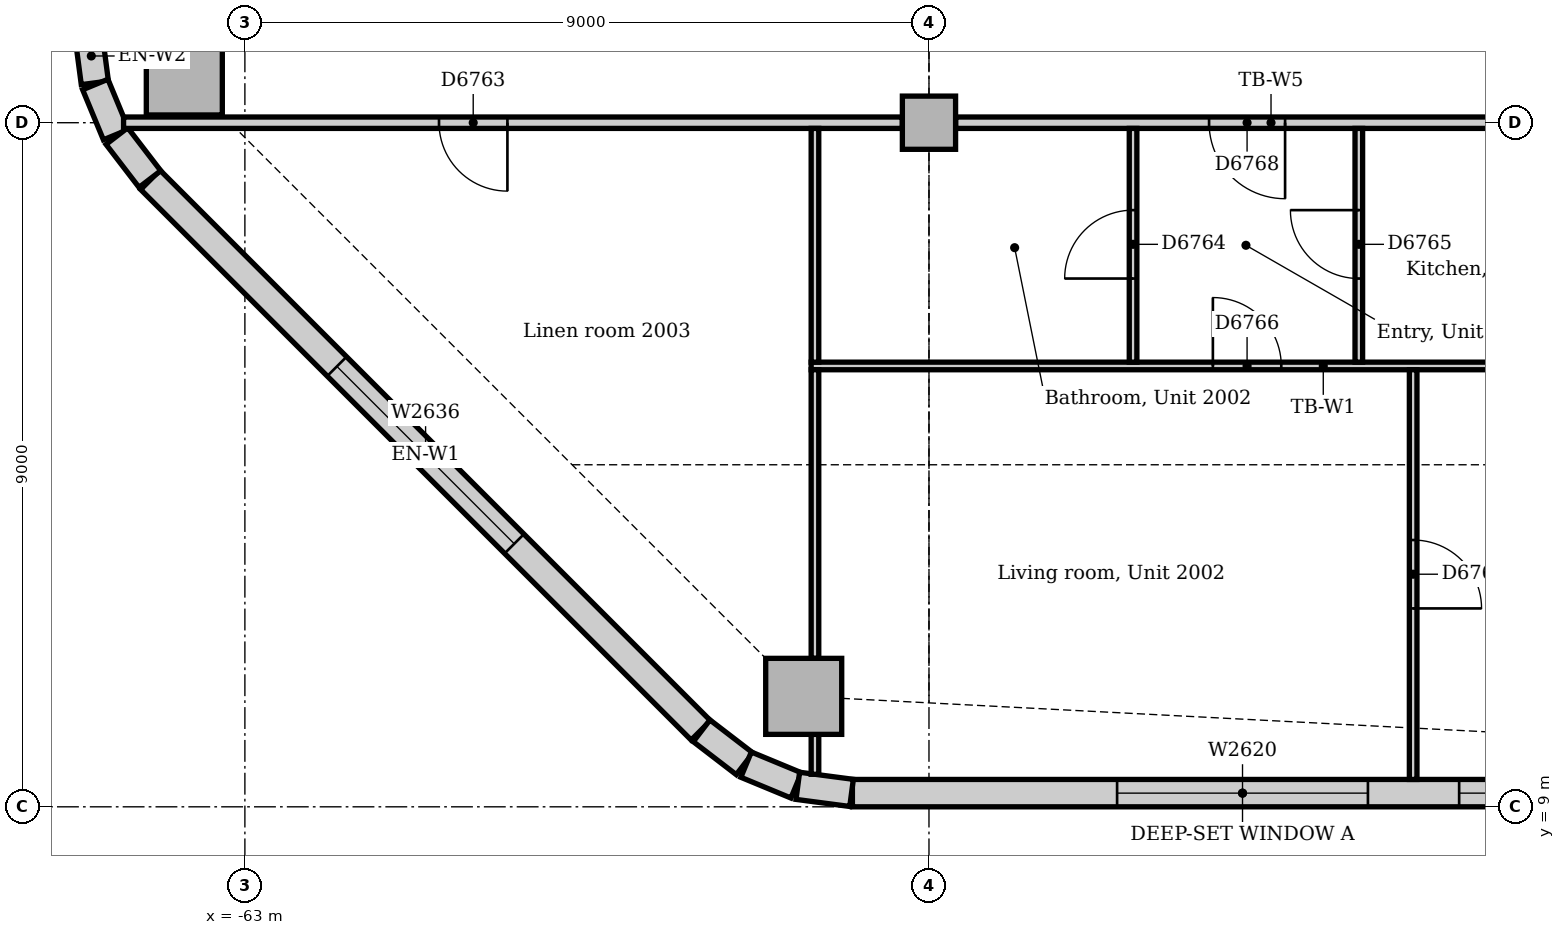
"""IFC4 building model, lengths in metres.
Left out: names, types, materials, properties, quantities, classifications, styles, units other than length and angle.
Written with IfcOpenShell. Run it as: python <this file> out.ifc"""

import sys

from ifc_helpers import new_model, si_unit, direction, frame, frame_2d, origin, origin_2d, place, context, subcontext, project, spatial, rectangle, extrude, element, fill, save


model = new_model("IFC4")
c1 = context("Model", 3, precision=1e-05, world=origin(), true_north=direction((0.0, 1.0)))
c2 = subcontext(c1, "Body", "Model", "MODEL_VIEW")
j1 = project(units=[si_unit("LENGTHUNIT", "METRE"), si_unit("PLANEANGLEUNIT", "RADIAN")], contexts=[c1])
p1 = place(None, origin())
s1 = spatial("IfcSite", under=j1, at=p1, CompositionType="ELEMENT")
p2 = place(p1, origin())
s2 = spatial("IfcBuilding", under=s1, at=p2, CompositionType="ELEMENT")
p3 = place(p2, frame((0.0, 0.0, 87.0)))
s3 = spatial("IfcBuildingStorey", under=s2, at=p3, CompositionType="ELEMENT", Elevation=87.0)
for number, where, z_axis, x_axis in (
    (1, (-55.648, 10.453, 0.0), (0.0, 0.0, 1.0), (1.0, 0.0, 0.0)),
    (2, (-63.797, 18.602, 0.0), (0.0, 0.0, 1.0), (1.0, 0.0, 0.0)),
):
    element("IfcColumn", number, at=place(p3, frame(where, z_axis=z_axis, x_axis=x_axis)), inside=s3, PredefinedType="COLUMN", context=c2, shape_type="SweptSolid", body=[
        extrude(rectangle(XDim=1.0, YDim=1.0, at=origin_2d()), origin(), (0.0, 0.0, 1.0), 3.85),
    ])
p4 = place(p3, frame((-54.0, 18.0, 0.0), z_axis=(0.0, 0.0, 1.0), x_axis=(1.0, 0.0, 0.0)))
e3 = element("IfcColumn", 3, at=p4, inside=s3, PredefinedType="COLUMN", context=c2, shape_type="SweptSolid", body=[
    extrude(rectangle(XDim=0.7, YDim=0.7, at=origin_2d()), origin(), (0.0, 0.0, 1.0), 3.85),
])
p5 = place(p3, frame((-55.007, 9.18, 0.0), z_axis=(0.0, 0.0, 1.0), x_axis=(1.0, 0.0, 0.0)))
e4 = element("IfcWall", 4, at=p5, inside=s3, PredefinedType="STANDARD", context=c2, shape_type="SweptSolid", body=[
    extrude(rectangle(XDim=23.765, YDim=0.36, at=frame_2d((11.882, 0.0))), origin(), (0.0, 0.0, 1.0), 3.85),
])
p6 = place(p5, frame((3.482, 0.0, 0.9)))
e5 = element("IfcOpeningElement", 5, at=p6, cuts=e4, PredefinedType="OPENING", context=c2, shape_type="SweptSolid", body=[
    extrude(rectangle(XDim=3.3, YDim=1.6, at=frame_2d((1.65, 0.8))), frame((0.0, 0.19, 0.0), z_axis=(0.0, -1.0, 0.0), x_axis=(1.0, 0.0, 0.0)), (0.0, 0.0, 1.0), 0.38),
])
p7 = place(p5, frame((7.982, 0.0, 0.9)))
e6 = element("IfcOpeningElement", 6, at=p7, cuts=e4, PredefinedType="OPENING", context=c2, shape_type="SweptSolid", body=[
    extrude(rectangle(XDim=3.3, YDim=1.6, at=frame_2d((1.65, 0.8))), frame((0.0, 0.19, 0.0), z_axis=(0.0, -1.0, 0.0), x_axis=(1.0, 0.0, 0.0)), (0.0, 0.0, 1.0), 0.38),
])
p8 = place(p5, frame((13.232, 0.0, 0.9)))
e7 = element("IfcOpeningElement", 7, at=p8, cuts=e4, PredefinedType="OPENING", context=c2, shape_type="SweptSolid", body=[
    extrude(rectangle(XDim=1.8, YDim=1.6, at=frame_2d((0.9, 0.8))), frame((0.0, 0.19, 0.0), z_axis=(0.0, -1.0, 0.0), x_axis=(1.0, 0.0, 0.0)), (0.0, 0.0, 1.0), 0.38),
])
p9 = place(p5, frame((16.982, 0.0, 0.9)))
e8 = element("IfcOpeningElement", 8, at=p9, cuts=e4, PredefinedType="OPENING", context=c2, shape_type="SweptSolid", body=[
    extrude(rectangle(XDim=3.3, YDim=1.6, at=frame_2d((1.65, 0.8))), frame((0.0, 0.19, 0.0), z_axis=(0.0, -1.0, 0.0), x_axis=(1.0, 0.0, 0.0)), (0.0, 0.0, 1.0), 0.38),
])
p10 = place(p3, frame((-64.244, 17.249, 0.0), z_axis=(0.0, 0.0, 1.0), x_axis=(0.707106781187, -0.707106781187, 0.0)))
e9 = element("IfcWall", 9, at=p10, inside=s3, PredefinedType="STANDARD", context=c2, shape_type="SweptSolid", body=[
    extrude(rectangle(XDim=10.243, YDim=0.36, at=frame_2d((5.121, 0.0))), origin(), (0.0, 0.0, 1.0), 3.85),
])
p11 = place(p10, frame((3.471, 0.0, 0.9)))
e10 = element("IfcOpeningElement", 10, at=p11, cuts=e9, PredefinedType="OPENING", context=c2, shape_type="SweptSolid", body=[
    extrude(rectangle(XDim=3.3, YDim=1.6, at=frame_2d((1.65, 0.8))), frame((0.0, 0.19, 0.0), z_axis=(0.0, -1.0, 0.0), x_axis=(1.0, 0.0, 0.0)), (0.0, 0.0, 1.0), 0.38),
])
for number, where, z_axis, x_axis in (
    (11, (-65.067, 19.231, 0.0), (0.0, 0.0, 1.0), (0.131, -0.991, 0.0)),
    (12, (-64.968, 18.503, 0.0), (0.0, 0.0, 1.0), (0.383, -0.924, 0.0)),
):
    element("IfcWall", number, at=place(p3, frame(where, z_axis=z_axis, x_axis=x_axis)), inside=s3, PredefinedType="STANDARD", context=c2, shape_type="SweptSolid", body=[
        extrude(rectangle(XDim=0.713, YDim=0.36, at=frame_2d((0.356, 0.0))), origin(), (0.0, 0.0, 1.0), 3.85),
    ])
for number, where, z_axis, x_axis in (
    (13, (-64.684, 17.825, 0.0), (0.0, 0.0, 1.0), (0.609, -0.793, 0.0)),
    (14, (-56.991, 10.0, 0.0), (0.0, 0.0, 1.0), (0.793, -0.609, 0.0)),
):
    element("IfcWall", number, at=place(p3, frame(where, z_axis=z_axis, x_axis=x_axis)), inside=s3, PredefinedType="STANDARD", context=c2, shape_type="SweptSolid", body=[
        extrude(rectangle(XDim=0.713, YDim=0.36, at=frame_2d((0.357, 0.0))), origin(), (0.0, 0.0, 1.0), 3.85),
    ])
for number, where, z_axis, x_axis in (
    (15, (-56.406, 9.555, 0.0), (0.0, 0.0, 1.0), (0.924, -0.383, 0.0)),
    (16, (-55.726, 9.276, 0.0), (0.0, 0.0, 1.0), (0.991, -0.131, 0.0)),
):
    element("IfcWall", number, at=place(p3, frame(where, z_axis=z_axis, x_axis=x_axis)), inside=s3, PredefinedType="STANDARD", context=c2, shape_type="SweptSolid", body=[
        extrude(rectangle(XDim=0.713, YDim=0.36, at=frame_2d((0.356, 0.0))), origin(), (0.0, 0.0, 1.0), 3.85),
    ])
p12 = place(p3, frame((-53.65, 18.0, 0.0), z_axis=(0.0, 0.0, 1.0), x_axis=(1.0, 0.0, 0.0)))
e17 = element("IfcWall", 17, at=p12, inside=s3, PredefinedType="PARTITIONING", context=c2, shape_type="SweptSolid", body=[
    extrude(rectangle(XDim=8.3, YDim=0.15, at=frame_2d((4.15, 0.0))), origin(), (0.0, 0.0, 1.0), 3.158),
])
p13 = place(p12, frame((3.335, 0.0, 0.0)))
e18 = element("IfcOpeningElement", 18, at=p13, cuts=e17, PredefinedType="OPENING", context=c2, shape_type="SweptSolid", body=[
    extrude(rectangle(XDim=1.0, YDim=2.1, at=frame_2d((0.5, 1.05))), frame((0.0, 0.085, 0.0), z_axis=(0.0, -1.0, 0.0), x_axis=(1.0, 0.0, 0.0)), (0.0, 0.0, 1.0), 0.17),
])
p14 = place(p3, frame((-64.596, 18.0, 0.0), z_axis=(0.0, 0.0, 1.0), x_axis=(1.0, 0.0, 0.0)))
e19 = element("IfcWall", 19, at=p14, inside=s3, PredefinedType="PARTITIONING", context=c2, shape_type="SweptSolid", body=[
    extrude(rectangle(XDim=10.246, YDim=0.15, at=frame_2d((5.123, 0.0))), origin(), (0.0, 0.0, 1.0), 3.158),
])
p15 = place(p14, frame((4.15, 0.0, 0.0)))
e20 = element("IfcOpeningElement", 20, at=p15, cuts=e19, PredefinedType="OPENING", context=c2, shape_type="SweptSolid", body=[
    extrude(rectangle(XDim=0.9, YDim=2.1, at=frame_2d((0.45, 1.05))), frame((0.0, 0.085, 0.0), z_axis=(0.0, -1.0, 0.0), x_axis=(1.0, 0.0, 0.0)), (0.0, 0.0, 1.0), 0.17),
])
p16 = place(p3, frame((-55.55, 14.8, 0.0), z_axis=(0.0, 0.0, 1.0), x_axis=(1.0, 0.0, 0.0)))
e21 = element("IfcWall", 21, at=p16, inside=s3, PredefinedType="PARTITIONING", context=c2, shape_type="SweptSolid", body=[
    extrude(rectangle(XDim=13.475, YDim=0.1, at=frame_2d((6.737, 0.0))), origin(), (0.0, 0.0, 1.0), 3.85),
])
p17 = place(p16, frame((5.285, 0.0, 0.0)))
e22 = element("IfcOpeningElement", 22, at=p17, cuts=e21, PredefinedType="OPENING", context=c2, shape_type="SweptSolid", body=[
    extrude(rectangle(XDim=0.9, YDim=2.1, at=frame_2d((0.45, 1.05))), frame((0.0, 0.06, 0.0), z_axis=(0.0, -1.0, 0.0), x_axis=(1.0, 0.0, 0.0)), (0.0, 0.0, 1.0), 0.12),
])
p18 = place(p3, frame((-55.5, 14.85, 0.0), z_axis=(0.0, 0.0, 1.0), x_axis=(0.0, 1.0, 0.0)))
e23 = element("IfcWall", 23, at=p18, inside=s3, PredefinedType="PARTITIONING", context=c2, shape_type="SweptSolid", body=[
    extrude(rectangle(XDim=3.075, YDim=0.1, at=frame_2d((1.538, 0.0))), origin(), (0.0, 0.0, 1.0), 3.85),
])
p19 = place(p3, frame((-55.5, 10.953, 0.0), z_axis=(0.0, 0.0, 1.0), x_axis=(0.0, 1.0, 0.0)))
e24 = element("IfcWall", 24, at=p19, inside=s3, PredefinedType="PARTITIONING", context=c2, shape_type="SweptSolid", body=[
    extrude(rectangle(XDim=3.797, YDim=0.1, at=frame_2d((1.898, 0.0))), origin(), (0.0, 0.0, 1.0), 3.85),
])
p20 = place(p3, frame((-55.5, 9.428, 0.0), z_axis=(0.0, 0.0, 1.0), x_axis=(0.0, 1.0, 0.0)))
e25 = element("IfcWall", 25, at=p20, inside=s3, PredefinedType="PARTITIONING", context=c2, shape_type="SweptSolid", body=[
    extrude(rectangle(XDim=0.525, YDim=0.1, at=frame_2d((0.263, 0.0))), origin(), (0.0, 0.0, 1.0), 3.85),
])
p21 = place(p3, frame((-47.63, 9.36, 0.0), z_axis=(0.0, 0.0, 1.0), x_axis=(0.0, 1.0, 0.0)))
e26 = element("IfcWall", 26, at=p21, inside=s3, PredefinedType="PARTITIONING", context=c2, shape_type="SweptSolid", body=[
    extrude(rectangle(XDim=5.39, YDim=0.1, at=frame_2d((2.695, 0.0))), origin(), (0.0, 0.0, 1.0), 3.85),
])
p22 = place(p21, frame((2.25, 0.0, 0.0)))
e27 = element("IfcOpeningElement", 27, at=p22, cuts=e26, PredefinedType="OPENING", context=c2, shape_type="SweptSolid", body=[
    extrude(rectangle(XDim=0.9, YDim=2.1, at=frame_2d((0.45, 1.05))), frame((0.0, 0.06, 0.0), z_axis=(0.0, -1.0, 0.0), x_axis=(1.0, 0.0, 0.0)), (0.0, 0.0, 1.0), 0.12),
])
p23 = place(p3, frame((-51.315, 14.85, 0.0), z_axis=(0.0, 0.0, 1.0), x_axis=(0.0, 1.0, 0.0)))
e28 = element("IfcWall", 28, at=p23, inside=s3, PredefinedType="PARTITIONING", context=c2, shape_type="SweptSolid", body=[
    extrude(rectangle(XDim=3.075, YDim=0.1, at=frame_2d((1.538, 0.0))), origin(), (0.0, 0.0, 1.0), 3.85),
])
p24 = place(p23, frame((1.1, 0.0, 0.0)))
e29 = element("IfcOpeningElement", 29, at=p24, cuts=e28, PredefinedType="OPENING", context=c2, shape_type="SweptSolid", body=[
    extrude(rectangle(XDim=0.9, YDim=2.1, at=frame_2d((0.45, 1.05))), frame((0.0, 0.06, 0.0), z_axis=(0.0, -1.0, 0.0), x_axis=(1.0, 0.0, 0.0)), (0.0, 0.0, 1.0), 0.12),
])
p25 = place(p3, frame((-48.345, 14.85, 0.0), z_axis=(0.0, 0.0, 1.0), x_axis=(0.0, 1.0, 0.0)))
e30 = element("IfcWall", 30, at=p25, inside=s3, PredefinedType="PARTITIONING", context=c2, shape_type="SweptSolid", body=[
    extrude(rectangle(XDim=3.075, YDim=0.1, at=frame_2d((1.538, 0.0))), origin(), (0.0, 0.0, 1.0), 3.85),
])
p26 = place(p25, frame((1.1, 0.0, 0.0)))
e31 = element("IfcOpeningElement", 31, at=p26, cuts=e30, PredefinedType="OPENING", context=c2, shape_type="SweptSolid", body=[
    extrude(rectangle(XDim=0.9, YDim=2.1, at=frame_2d((0.45, 1.05))), frame((0.0, 0.06, 0.0), z_axis=(0.0, -1.0, 0.0), x_axis=(1.0, 0.0, 0.0)), (0.0, 0.0, 1.0), 0.12),
])
p27 = place(p6, origin())
e32 = element("IfcWindow", 32, at=p27, inside=s3, PartitioningType="SINGLE_PANEL", PredefinedType="WINDOW", context=c2, shape_type="SweptSolid", body=[
    extrude(rectangle(XDim=3.3, YDim=1.6, at=frame_2d((1.65, 0.8))), frame((0.0, 0.13, 0.0), z_axis=(0.0, -1.0, 0.0), x_axis=(1.0, 0.0, 0.0)), (0.0, 0.0, 1.0), 0.06),
])
fill(e5, e32)
p28 = place(p7, origin())
e33 = element("IfcWindow", 33, at=p28, inside=s3, PartitioningType="SINGLE_PANEL", PredefinedType="WINDOW", context=c2, shape_type="SweptSolid", body=[
    extrude(rectangle(XDim=3.3, YDim=1.6, at=frame_2d((1.65, 0.8))), frame((0.0, 0.13, 0.0), z_axis=(0.0, -1.0, 0.0), x_axis=(1.0, 0.0, 0.0)), (0.0, 0.0, 1.0), 0.06),
])
fill(e6, e33)
p29 = place(p11, origin())
e34 = element("IfcWindow", 34, at=p29, inside=s3, PartitioningType="SINGLE_PANEL", PredefinedType="WINDOW", context=c2, shape_type="SweptSolid", body=[
    extrude(rectangle(XDim=3.3, YDim=1.6, at=frame_2d((1.65, 0.8))), frame((0.0, 0.13, 0.0), z_axis=(0.0, -1.0, 0.0), x_axis=(1.0, 0.0, 0.0)), (0.0, 0.0, 1.0), 0.06),
])
fill(e10, e34)
p30 = place(p15, frame((0.9, 0.0, 0.0), z_axis=(0.0, 0.0, 1.0), x_axis=(-1.0, 0.0, 0.0)))
e35 = element("IfcDoor", 35, at=p30, inside=s3, OperationType="SINGLE_SWING_LEFT", PredefinedType="DOOR", context=c2, shape_type="SweptSolid", body=[
    extrude(rectangle(XDim=0.9, YDim=2.1, at=frame_2d((0.45, 1.05))), frame((0.0, 0.025, 0.0), z_axis=(0.0, -1.0, 0.0), x_axis=(1.0, 0.0, 0.0)), (0.0, 0.0, 1.0), 0.05),
])
fill(e20, e35)
p31 = place(p24, origin())
e36 = element("IfcDoor", 36, at=p31, inside=s3, OperationType="SINGLE_SWING_LEFT", PredefinedType="DOOR", context=c2, shape_type="SweptSolid", body=[
    extrude(rectangle(XDim=0.9, YDim=2.1, at=frame_2d((0.45, 1.05))), frame((0.0, 0.025, 0.0), z_axis=(0.0, -1.0, 0.0), x_axis=(1.0, 0.0, 0.0)), (0.0, 0.0, 1.0), 0.05),
])
fill(e29, e36)
p32 = place(p26, origin())
e37 = element("IfcDoor", 37, at=p32, inside=s3, OperationType="SINGLE_SWING_RIGHT", PredefinedType="DOOR", context=c2, shape_type="SweptSolid", body=[
    extrude(rectangle(XDim=0.9, YDim=2.1, at=frame_2d((0.45, 1.05))), frame((0.0, 0.025, 0.0), z_axis=(0.0, -1.0, 0.0), x_axis=(1.0, 0.0, 0.0)), (0.0, 0.0, 1.0), 0.05),
])
fill(e31, e37)
p33 = place(p17, origin())
e38 = element("IfcDoor", 38, at=p33, inside=s3, OperationType="SINGLE_SWING_LEFT", PredefinedType="DOOR", context=c2, shape_type="SweptSolid", body=[
    extrude(rectangle(XDim=0.9, YDim=2.1, at=frame_2d((0.45, 1.05))), frame((0.0, 0.025, 0.0), z_axis=(0.0, -1.0, 0.0), x_axis=(1.0, 0.0, 0.0)), (0.0, 0.0, 1.0), 0.05),
])
fill(e22, e38)
p34 = place(p22, frame((0.9, 0.0, 0.0), z_axis=(0.0, 0.0, 1.0), x_axis=(-1.0, 0.0, 0.0)))
e39 = element("IfcDoor", 39, at=p34, inside=s3, OperationType="SINGLE_SWING_RIGHT", PredefinedType="DOOR", context=c2, shape_type="SweptSolid", body=[
    extrude(rectangle(XDim=0.9, YDim=2.1, at=frame_2d((0.45, 1.05))), frame((0.0, 0.025, 0.0), z_axis=(0.0, -1.0, 0.0), x_axis=(1.0, 0.0, 0.0)), (0.0, 0.0, 1.0), 0.05),
])
fill(e27, e39)
p35 = place(p13, frame((1.0, 0.0, 0.0), z_axis=(0.0, 0.0, 1.0), x_axis=(-1.0, 0.0, 0.0)))
e40 = element("IfcDoor", 40, at=p35, inside=s3, OperationType="SINGLE_SWING_LEFT", PredefinedType="DOOR", context=c2, shape_type="SweptSolid", body=[
    extrude(rectangle(XDim=1.0, YDim=2.1, at=frame_2d((0.5, 1.05))), frame((0.0, 0.025, 0.0), z_axis=(0.0, -1.0, 0.0), x_axis=(1.0, 0.0, 0.0)), (0.0, 0.0, 1.0), 0.05),
])
fill(e18, e40)
save(model, sys.argv[1])
